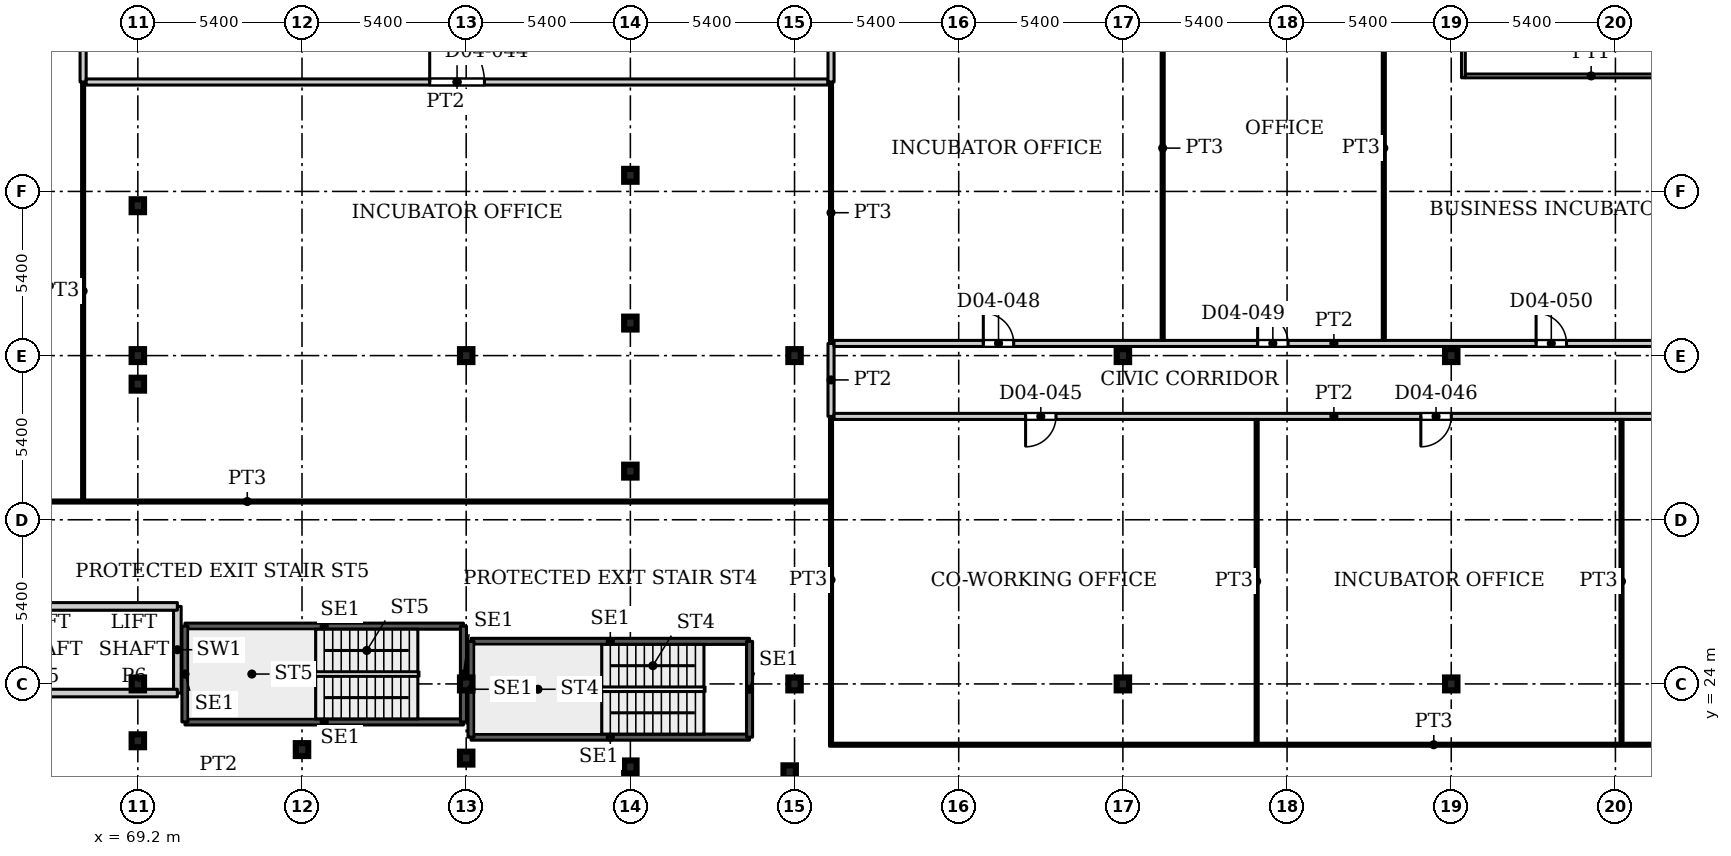
"""IFC4 building model, lengths in metres.
Left out: names, types, materials, properties, quantities, classifications, styles, units other than length and angle.
Written with IfcOpenShell. Run it as: python <this file> out.ifc"""

import sys

from ifc_helpers import new_model, si_unit, direction, frame, frame_2d, origin, origin_2d, place, context, subcontext, project, spatial, rectangle, i_section, extrude, source, transform, mapped, element, fill, save


model = new_model("IFC4")
c1 = context("Model", 3, precision=1e-05, world=origin(), true_north=direction((0.0, 1.0)))
c2 = subcontext(c1, "Body", "Model", "MODEL_VIEW")
j1 = project(units=[si_unit("LENGTHUNIT", "METRE"), si_unit("PLANEANGLEUNIT", "RADIAN")], contexts=[c1])
p1 = place(None, origin())
s1 = spatial("IfcSite", under=j1, at=p1, CompositionType="ELEMENT")
p2 = place(p1, origin())
s2 = spatial("IfcBuilding", under=s1, at=p2, CompositionType="ELEMENT")
p3 = place(p2, frame((0.0, 0.0, 21.5)))
s3 = spatial("IfcBuildingStorey", under=s2, at=p3, CompositionType="ELEMENT", Elevation=21.5)
for number, where, z_axis, x_axis in (
    (1, (69.2, 24.0, 0.0), (0.0, 0.0, 1.0), (1.0, 0.0, 0.0)),
    (2, (80.0, 24.0, 0.0), (0.0, 0.0, 1.0), (1.0, 0.0, 0.0)),
    (3, (90.8, 24.0, 0.0), (0.0, 0.0, 1.0), (1.0, 0.0, 0.0)),
    (4, (101.6, 24.0, 0.0), (0.0, 0.0, 1.0), (1.0, 0.0, 0.0)),
    (5, (112.4, 24.0, 0.0), (0.0, 0.0, 1.0), (1.0, 0.0, 0.0)),
    (6, (69.2, 34.8, 0.0), (0.0, 0.0, 1.0), (1.0, 0.0, 0.0)),
    (7, (80.0, 34.8, 0.0), (0.0, 0.0, 1.0), (1.0, 0.0, 0.0)),
    (8, (90.8, 34.8, 0.0), (0.0, 0.0, 1.0), (1.0, 0.0, 0.0)),
    (9, (101.6, 34.8, 0.0), (0.0, 0.0, 1.0), (1.0, 0.0, 0.0)),
    (10, (112.4, 34.8, 0.0), (0.0, 0.0, 1.0), (1.0, 0.0, 0.0)),
    (11, (90.64, 21.11, 0.0), (0.0, 0.0, 1.0), (1.0, 0.0, 0.0)),
    (12, (85.4, 21.27, 0.0), (0.0, 0.0, 1.0), (1.0, 0.0, 0.0)),
    (13, (80.0, 21.56, 0.0), (0.0, 0.0, 1.0), (1.0, 0.0, 0.0)),
    (14, (74.6, 21.84, 0.0), (0.0, 0.0, 1.0), (1.0, 0.0, 0.0)),
    (15, (69.2, 22.13, 0.0), (0.0, 0.0, 1.0), (1.0, 0.0, 0.0)),
    (16, (85.4, 31.0, 0.0), (0.0, 0.0, 1.0), (1.0, 0.0, 0.0)),
    (17, (69.2, 33.86, 0.0), (0.0, 0.0, 1.0), (1.0, 0.0, 0.0)),
    (18, (85.4, 35.87, 0.0), (0.0, 0.0, 1.0), (1.0, 0.0, 0.0)),
    (19, (69.2, 39.73, 0.0), (0.0, 0.0, 1.0), (1.0, 0.0, 0.0)),
    (20, (85.4, 40.73, 0.0), (0.0, 0.0, 1.0), (1.0, 0.0, 0.0)),
):
    element("IfcColumn", number, at=place(p3, frame(where, z_axis=z_axis, x_axis=x_axis)), inside=s3, PredefinedType="COLUMN", context=c2, shape_type="SweptSolid", body=[
        extrude(i_section(OverallWidth=0.409, OverallDepth=0.425, WebThickness=0.033, FlangeThickness=0.052, FilletRadius=0.013, at=origin_2d()), origin(), (0.0, 0.0, 1.0), 4.5),
    ])
for number, where, z_axis, x_axis in (
    (21, (80.16, 22.25, 0.0), (0.0, 0.0, 1.0), (1.0, 0.0, 0.0)),
    (22, (80.16, 25.4, 0.0), (0.0, 0.0, 1.0), (1.0, 0.0, 0.0)),
):
    element("IfcWall", number, at=place(p3, frame(where, z_axis=z_axis, x_axis=x_axis)), inside=s3, PredefinedType="SHEAR", context=c2, shape_type="SweptSolid", body=[
        extrude(rectangle(XDim=9.16, YDim=0.2, at=frame_2d((4.58, 0.0))), origin(), (0.0, 0.0, 1.0), 4.5),
    ])
for number, where, z_axis, x_axis in (
    (23, (80.16, 22.25, 0.0), (0.0, 0.0, 1.0), (0.0, 1.0, 0.0)),
    (24, (89.32, 22.25, 0.0), (0.0, 0.0, 1.0), (0.0, 1.0, 0.0)),
):
    element("IfcWall", number, at=place(p3, frame(where, z_axis=z_axis, x_axis=x_axis)), inside=s3, PredefinedType="SHEAR", context=c2, shape_type="SweptSolid", body=[
        extrude(rectangle(XDim=3.15, YDim=0.2, at=frame_2d((1.575, 0.0))), origin(), (0.0, 0.0, 1.0), 4.5),
    ])
for number, where, z_axis, x_axis in (
    (25, (70.75, 22.75, 0.0), (0.0, 0.0, 1.0), (1.0, 0.0, 0.0)),
    (26, (70.75, 25.9, 0.0), (0.0, 0.0, 1.0), (1.0, 0.0, 0.0)),
):
    element("IfcWall", number, at=place(p3, frame(where, z_axis=z_axis, x_axis=x_axis)), inside=s3, PredefinedType="SHEAR", context=c2, shape_type="SweptSolid", body=[
        extrude(rectangle(XDim=9.16, YDim=0.2, at=frame_2d((4.58, 0.0))), origin(), (0.0, 0.0, 1.0), 4.5),
    ])
for number, where, z_axis, x_axis in (
    (27, (70.75, 22.75, 0.0), (0.0, 0.0, 1.0), (0.0, 1.0, 0.0)),
    (28, (79.91, 22.75, 0.0), (0.0, 0.0, 1.0), (0.0, 1.0, 0.0)),
):
    element("IfcWall", number, at=place(p3, frame(where, z_axis=z_axis, x_axis=x_axis)), inside=s3, PredefinedType="SHEAR", context=c2, shape_type="SweptSolid", body=[
        extrude(rectangle(XDim=3.15, YDim=0.2, at=frame_2d((1.575, 0.0))), origin(), (0.0, 0.0, 1.0), 4.5),
    ])
p4 = place(p3, frame((70.5, 23.7, 0.0), z_axis=(0.0, 0.0, 1.0), x_axis=(0.0, 1.0, 0.0)))
e29 = element("IfcWall", 29, at=p4, inside=s3, PredefinedType="PARTITIONING", context=c2, shape_type="SweptSolid", body=[
    extrude(rectangle(XDim=2.85, YDim=0.25, at=frame_2d((1.425, 0.0))), origin(), (0.0, 0.0, 1.0), 4.5),
])
for number, where, z_axis, x_axis in (
    (30, (53.4, 23.7, 0.0), (0.0, 0.0, 1.0), (1.0, 0.0, 0.0)),
    (31, (53.4, 26.55, 0.0), (0.0, 0.0, 1.0), (1.0, 0.0, 0.0)),
):
    element("IfcWall", number, at=place(p3, frame(where, z_axis=z_axis, x_axis=x_axis)), inside=s3, PredefinedType="PARTITIONING", context=c2, shape_type="SweptSolid", body=[
        extrude(rectangle(XDim=17.1, YDim=0.25, at=frame_2d((8.55, 0.0))), origin(), (0.0, 0.0, 1.0), 4.5),
    ])
p5 = place(p3, frame((53.649, 30.0, 0.0), z_axis=(0.0, 0.0, 1.0), x_axis=(1.0, 0.0, 0.0)))
e32 = element("IfcWall", 32, at=p5, inside=s3, PredefinedType="PARTITIONING", context=c2, shape_type="SweptSolid", body=[
    extrude(rectangle(XDim=38.301, YDim=0.1, at=frame_2d((19.15, 0.0))), origin(), (0.0, 0.0, 1.0), 4.18),
])
p6 = place(p3, frame((67.4, 30.05, 0.0), z_axis=(0.0, 0.0, 1.0), x_axis=(0.0, 1.0, 0.0)))
e33 = element("IfcWall", 33, at=p6, inside=s3, PredefinedType="PARTITIONING", context=c2, shape_type="SweptSolid", body=[
    extrude(rectangle(XDim=13.75, YDim=0.1, at=frame_2d((6.875, 0.0))), origin(), (0.0, 0.0, 1.0), 4.18),
])
p7 = place(p3, frame((67.4, 43.8, 0.0), z_axis=(0.0, 0.0, 1.0), x_axis=(0.0, 1.0, 0.0)))
e34 = element("IfcWall", 34, at=p7, inside=s3, PredefinedType="PARTITIONING", context=c2, shape_type="SweptSolid", body=[
    extrude(rectangle(XDim=25.2, YDim=0.2, at=frame_2d((12.6, 0.0))), origin(), (0.0, 0.0, 1.0), 4.18),
])
p8 = place(p7, frame((7.25, 0.0, 0.0)))
e35 = element("IfcOpeningElement", 35, at=p8, cuts=e34, PredefinedType="OPENING", context=c2, shape_type="SweptSolid", body=[
    extrude(rectangle(XDim=1.8, YDim=2.1, at=frame_2d((0.9, 1.05))), frame((0.0, 0.11, 0.0), z_axis=(0.0, -1.0, 0.0), x_axis=(1.0, 0.0, 0.0)), (0.0, 0.0, 1.0), 0.22),
])
p9 = place(p7, frame((19.75, 0.0, 0.0)))
e36 = element("IfcOpeningElement", 36, at=p9, cuts=e34, PredefinedType="OPENING", context=c2, shape_type="SweptSolid", body=[
    extrude(rectangle(XDim=1.8, YDim=2.1, at=frame_2d((0.9, 1.05))), frame((0.0, 0.11, 0.0), z_axis=(0.0, -1.0, 0.0), x_axis=(1.0, 0.0, 0.0)), (0.0, 0.0, 1.0), 0.22),
])
p10 = place(p3, frame((67.5, 43.8, 0.0), z_axis=(0.0, 0.0, 1.0), x_axis=(1.0, 0.0, 0.0)))
e37 = element("IfcWall", 37, at=p10, inside=s3, PredefinedType="PARTITIONING", context=c2, shape_type="SweptSolid", body=[
    extrude(rectangle(XDim=24.4, YDim=0.2, at=frame_2d((12.2, 0.0))), origin(), (0.0, 0.0, 1.0), 4.18),
])
p11 = place(p10, frame((11.3, 0.0, 0.0)))
e38 = element("IfcOpeningElement", 38, at=p11, cuts=e37, PredefinedType="OPENING", context=c2, shape_type="SweptSolid", body=[
    extrude(rectangle(XDim=1.8, YDim=2.1, at=frame_2d((0.9, 1.05))), frame((0.0, 0.11, 0.0), z_axis=(0.0, -1.0, 0.0), x_axis=(1.0, 0.0, 0.0)), (0.0, 0.0, 1.0), 0.22),
])
p12 = place(p3, frame((91.95, 22.0, 0.0), z_axis=(0.0, 0.0, 1.0), x_axis=(1.0, 0.0, 0.0)))
e39 = element("IfcWall", 39, at=p12, inside=s3, PredefinedType="PARTITIONING", context=c2, shape_type="SweptSolid", body=[
    extrude(rectangle(XDim=39.751, YDim=0.1, at=frame_2d((19.875, 0.0))), origin(), (0.0, 0.0, 1.0), 4.18),
])
p13 = place(p3, frame((92.0, 22.05, 0.0), z_axis=(0.0, 0.0, 1.0), x_axis=(0.0, 1.0, 0.0)))
e40 = element("IfcWall", 40, at=p13, inside=s3, PredefinedType="PARTITIONING", context=c2, shape_type="SweptSolid", body=[
    extrude(rectangle(XDim=10.75, YDim=0.1, at=frame_2d((5.375, 0.0))), origin(), (0.0, 0.0, 1.0), 4.18),
])
p14 = place(p3, frame((92.0, 32.8, 0.0), z_axis=(0.0, 0.0, 1.0), x_axis=(0.0, 1.0, 0.0)))
e41 = element("IfcWall", 41, at=p14, inside=s3, PredefinedType="PARTITIONING", context=c2, shape_type="SweptSolid", body=[
    extrude(rectangle(XDim=2.4, YDim=0.2, at=frame_2d((1.2, 0.0))), origin(), (0.0, 0.0, 1.0), 4.18),
])
p15 = place(p3, frame((92.0, 35.2, 0.0), z_axis=(0.0, 0.0, 1.0), x_axis=(0.0, 1.0, 0.0)))
e42 = element("IfcWall", 42, at=p15, inside=s3, PredefinedType="PARTITIONING", context=c2, shape_type="SweptSolid", body=[
    extrude(rectangle(XDim=8.6, YDim=0.1, at=frame_2d((4.3, 0.0))), origin(), (0.0, 0.0, 1.0), 4.18),
])
p16 = place(p3, frame((92.0, 43.8, 0.0), z_axis=(0.0, 0.0, 1.0), x_axis=(0.0, 1.0, 0.0)))
e43 = element("IfcWall", 43, at=p16, inside=s3, PredefinedType="PARTITIONING", context=c2, shape_type="SweptSolid", body=[
    extrude(rectangle(XDim=4.3, YDim=0.2, at=frame_2d((2.15, 0.0))), origin(), (0.0, 0.0, 1.0), 4.18),
])
p17 = place(p3, frame((92.1, 32.8, 0.0), z_axis=(0.0, 0.0, 1.0), x_axis=(1.0, 0.0, 0.0)))
e44 = element("IfcWall", 44, at=p17, inside=s3, PredefinedType="PARTITIONING", context=c2, shape_type="SweptSolid", body=[
    extrude(rectangle(XDim=32.881, YDim=0.2, at=frame_2d((16.44, 0.0))), origin(), (0.0, 0.0, 1.0), 4.18),
])
p18 = place(p17, frame((6.3, 0.0, 0.0)))
e45 = element("IfcOpeningElement", 45, at=p18, cuts=e44, PredefinedType="OPENING", context=c2, shape_type="SweptSolid", body=[
    extrude(rectangle(XDim=1.0, YDim=2.1, at=frame_2d((0.5, 1.05))), frame((0.0, 0.11, 0.0), z_axis=(0.0, -1.0, 0.0), x_axis=(1.0, 0.0, 0.0)), (0.0, 0.0, 1.0), 0.22),
])
p19 = place(p17, frame((19.3, 0.0, 0.0)))
e46 = element("IfcOpeningElement", 46, at=p19, cuts=e44, PredefinedType="OPENING", context=c2, shape_type="SweptSolid", body=[
    extrude(rectangle(XDim=1.0, YDim=2.1, at=frame_2d((0.5, 1.05))), frame((0.0, 0.11, 0.0), z_axis=(0.0, -1.0, 0.0), x_axis=(1.0, 0.0, 0.0)), (0.0, 0.0, 1.0), 0.22),
])
p20 = place(p17, frame((29.05, 0.0, 0.0)))
e47 = element("IfcOpeningElement", 47, at=p20, cuts=e44, PredefinedType="OPENING", context=c2, shape_type="SweptSolid", body=[
    extrude(rectangle(XDim=1.0, YDim=2.1, at=frame_2d((0.5, 1.05))), frame((0.0, 0.11, 0.0), z_axis=(0.0, -1.0, 0.0), x_axis=(1.0, 0.0, 0.0)), (0.0, 0.0, 1.0), 0.22),
])
p21 = place(p3, frame((92.1, 35.2, 0.0), z_axis=(0.0, 0.0, 1.0), x_axis=(1.0, 0.0, 0.0)))
e48 = element("IfcWall", 48, at=p21, inside=s3, PredefinedType="PARTITIONING", context=c2, shape_type="SweptSolid", body=[
    extrude(rectangle(XDim=32.88, YDim=0.2, at=frame_2d((16.44, 0.0))), origin(), (0.0, 0.0, 1.0), 4.18),
])
p22 = place(p21, frame((4.909, 0.0, 0.0)))
e49 = element("IfcOpeningElement", 49, at=p22, cuts=e48, PredefinedType="OPENING", context=c2, shape_type="SweptSolid", body=[
    extrude(rectangle(XDim=1.0, YDim=2.1, at=frame_2d((0.5, 1.05))), frame((0.0, 0.11, 0.0), z_axis=(0.0, -1.0, 0.0), x_axis=(1.0, 0.0, 0.0)), (0.0, 0.0, 1.0), 0.22),
])
p23 = place(p21, frame((13.932, 0.0, 0.0)))
e50 = element("IfcOpeningElement", 50, at=p23, cuts=e48, PredefinedType="OPENING", context=c2, shape_type="SweptSolid", body=[
    extrude(rectangle(XDim=1.0, YDim=2.1, at=frame_2d((0.5, 1.05))), frame((0.0, 0.11, 0.0), z_axis=(0.0, -1.0, 0.0), x_axis=(1.0, 0.0, 0.0)), (0.0, 0.0, 1.0), 0.22),
])
p24 = place(p21, frame((23.091, 0.0, 0.0)))
e51 = element("IfcOpeningElement", 51, at=p24, cuts=e48, PredefinedType="OPENING", context=c2, shape_type="SweptSolid", body=[
    extrude(rectangle(XDim=1.0, YDim=2.1, at=frame_2d((0.5, 1.05))), frame((0.0, 0.11, 0.0), z_axis=(0.0, -1.0, 0.0), x_axis=(1.0, 0.0, 0.0)), (0.0, 0.0, 1.0), 0.22),
])
p25 = place(p21, frame((29.477, 0.0, 0.0)))
e52 = element("IfcOpeningElement", 52, at=p25, cuts=e48, PredefinedType="OPENING", context=c2, shape_type="SweptSolid", body=[
    extrude(rectangle(XDim=1.0, YDim=2.1, at=frame_2d((0.5, 1.05))), frame((0.0, 0.11, 0.0), z_axis=(0.0, -1.0, 0.0), x_axis=(1.0, 0.0, 0.0)), (0.0, 0.0, 1.0), 0.22),
])
p26 = place(p3, frame((102.909, 35.3, 0.0), z_axis=(0.0, 0.0, 1.0), x_axis=(0.0, 1.0, 0.0)))
e53 = element("IfcWall", 53, at=p26, inside=s3, PredefinedType="PARTITIONING", context=c2, shape_type="SweptSolid", body=[
    extrude(rectangle(XDim=12.65, YDim=0.1, at=frame_2d((6.325, 0.0))), origin(), (0.0, 0.0, 1.0), 4.18),
])
p27 = place(p3, frame((106.0, 22.05, 0.0), z_axis=(0.0, 0.0, 1.0), x_axis=(0.0, 1.0, 0.0)))
e54 = element("IfcWall", 54, at=p27, inside=s3, PredefinedType="PARTITIONING", context=c2, shape_type="SweptSolid", body=[
    extrude(rectangle(XDim=10.65, YDim=0.1, at=frame_2d((5.325, 0.0))), origin(), (0.0, 0.0, 1.0), 4.18),
])
p28 = place(p3, frame((110.182, 35.3, 0.0), z_axis=(0.0, 0.0, 1.0), x_axis=(0.0, 1.0, 0.0)))
e55 = element("IfcWall", 55, at=p28, inside=s3, PredefinedType="PARTITIONING", context=c2, shape_type="SweptSolid", body=[
    extrude(rectangle(XDim=12.65, YDim=0.1, at=frame_2d((6.325, 0.0))), origin(), (0.0, 0.0, 1.0), 4.18),
])
p29 = place(p3, frame((112.8, 43.938, 0.0), z_axis=(0.0, 0.0, 1.0), x_axis=(0.0, 1.0, 0.0)))
e56 = element("IfcWall", 56, at=p29, inside=s3, PredefinedType="PARTITIONING", context=c2, shape_type="SweptSolid", body=[
    extrude(rectangle(XDim=46.787, YDim=0.125, at=frame_2d((23.394, 0.0))), origin(), (0.0, 0.0, 1.0), 4.18),
])
p30 = place(p3, frame((112.862, 44.0, 0.0), z_axis=(0.0, 0.0, 1.0), x_axis=(1.0, 0.0, 0.0)))
e57 = element("IfcWall", 57, at=p30, inside=s3, PredefinedType="PARTITIONING", context=c2, shape_type="SweptSolid", body=[
    extrude(rectangle(XDim=8.279, YDim=0.125, at=frame_2d((4.14, 0.0))), origin(), (0.0, 0.0, 1.0), 4.18),
])
p31 = place(p3, frame((118.0, 22.05, 0.0), z_axis=(0.0, 0.0, 1.0), x_axis=(0.0, 1.0, 0.0)))
e58 = element("IfcWall", 58, at=p31, inside=s3, PredefinedType="PARTITIONING", context=c2, shape_type="SweptSolid", body=[
    extrude(rectangle(XDim=10.65, YDim=0.1, at=frame_2d((5.325, 0.0))), origin(), (0.0, 0.0, 1.0), 4.18),
])
m1 = source(origin(), c2, "Body", "SweptSolid", [
    extrude(rectangle(XDim=1.8, YDim=2.1, at=frame_2d((0.9, 1.05))), frame((0.0, 0.025, 0.0), z_axis=(0.0, -1.0, 0.0), x_axis=(1.0, 0.0, 0.0)), (0.0, 0.0, 1.0), 0.05),
])
p32 = place(p11, origin())
e59 = element("IfcDoor", 59, at=p32, inside=s3, OperationType="DOUBLE_DOOR_SINGLE_SWING", PredefinedType="DOOR", context=c2, shape_type="MappedRepresentation", body=[
    mapped(m1, transform((0.0, 0.0, 0.0), x_axis=(1.0, 0.0, 0.0), y_axis=(0.0, 1.0, 0.0), z_axis=(0.0, 0.0, 1.0), scale=1.0)),
])
fill(e38, e59)
m2 = source(origin(), c2, "Body", "SweptSolid", [
    extrude(rectangle(XDim=1.0, YDim=2.1, at=frame_2d((0.5, 1.05))), frame((0.0, 0.025, 0.0), z_axis=(0.0, -1.0, 0.0), x_axis=(1.0, 0.0, 0.0)), (0.0, 0.0, 1.0), 0.05),
])
p33 = place(p18, origin())
e60 = element("IfcDoor", 60, at=p33, inside=s3, OperationType="SINGLE_SWING_RIGHT", PredefinedType="DOOR", context=c2, shape_type="MappedRepresentation", body=[
    mapped(m2, transform((0.0, 0.0, 0.0), x_axis=(1.0, 0.0, 0.0), y_axis=(0.0, 1.0, 0.0), z_axis=(0.0, 0.0, 1.0), scale=1.0)),
])
fill(e45, e60)
p34 = place(p19, origin())
e61 = element("IfcDoor", 61, at=p34, inside=s3, OperationType="SINGLE_SWING_RIGHT", PredefinedType="DOOR", context=c2, shape_type="MappedRepresentation", body=[
    mapped(m2, transform((0.0, 0.0, 0.0), x_axis=(1.0, 0.0, 0.0), y_axis=(0.0, 1.0, 0.0), z_axis=(0.0, 0.0, 1.0), scale=1.0)),
])
fill(e46, e61)
p35 = place(p22, origin())
e62 = element("IfcDoor", 62, at=p35, inside=s3, OperationType="SINGLE_SWING_LEFT", PredefinedType="DOOR", context=c2, shape_type="MappedRepresentation", body=[
    mapped(m2, transform((0.0, 0.0, 0.0), x_axis=(1.0, 0.0, 0.0), y_axis=(0.0, 1.0, 0.0), z_axis=(0.0, 0.0, 1.0), scale=1.0)),
])
fill(e49, e62)
p36 = place(p23, origin())
e63 = element("IfcDoor", 63, at=p36, inside=s3, OperationType="SINGLE_SWING_LEFT", PredefinedType="DOOR", context=c2, shape_type="MappedRepresentation", body=[
    mapped(m2, transform((0.0, 0.0, 0.0), x_axis=(1.0, 0.0, 0.0), y_axis=(0.0, 1.0, 0.0), z_axis=(0.0, 0.0, 1.0), scale=1.0)),
])
fill(e50, e63)
p37 = place(p24, origin())
e64 = element("IfcDoor", 64, at=p37, inside=s3, OperationType="SINGLE_SWING_LEFT", PredefinedType="DOOR", context=c2, shape_type="MappedRepresentation", body=[
    mapped(m2, transform((0.0, 0.0, 0.0), x_axis=(1.0, 0.0, 0.0), y_axis=(0.0, 1.0, 0.0), z_axis=(0.0, 0.0, 1.0), scale=1.0)),
])
fill(e51, e64)
save(model, sys.argv[1])
